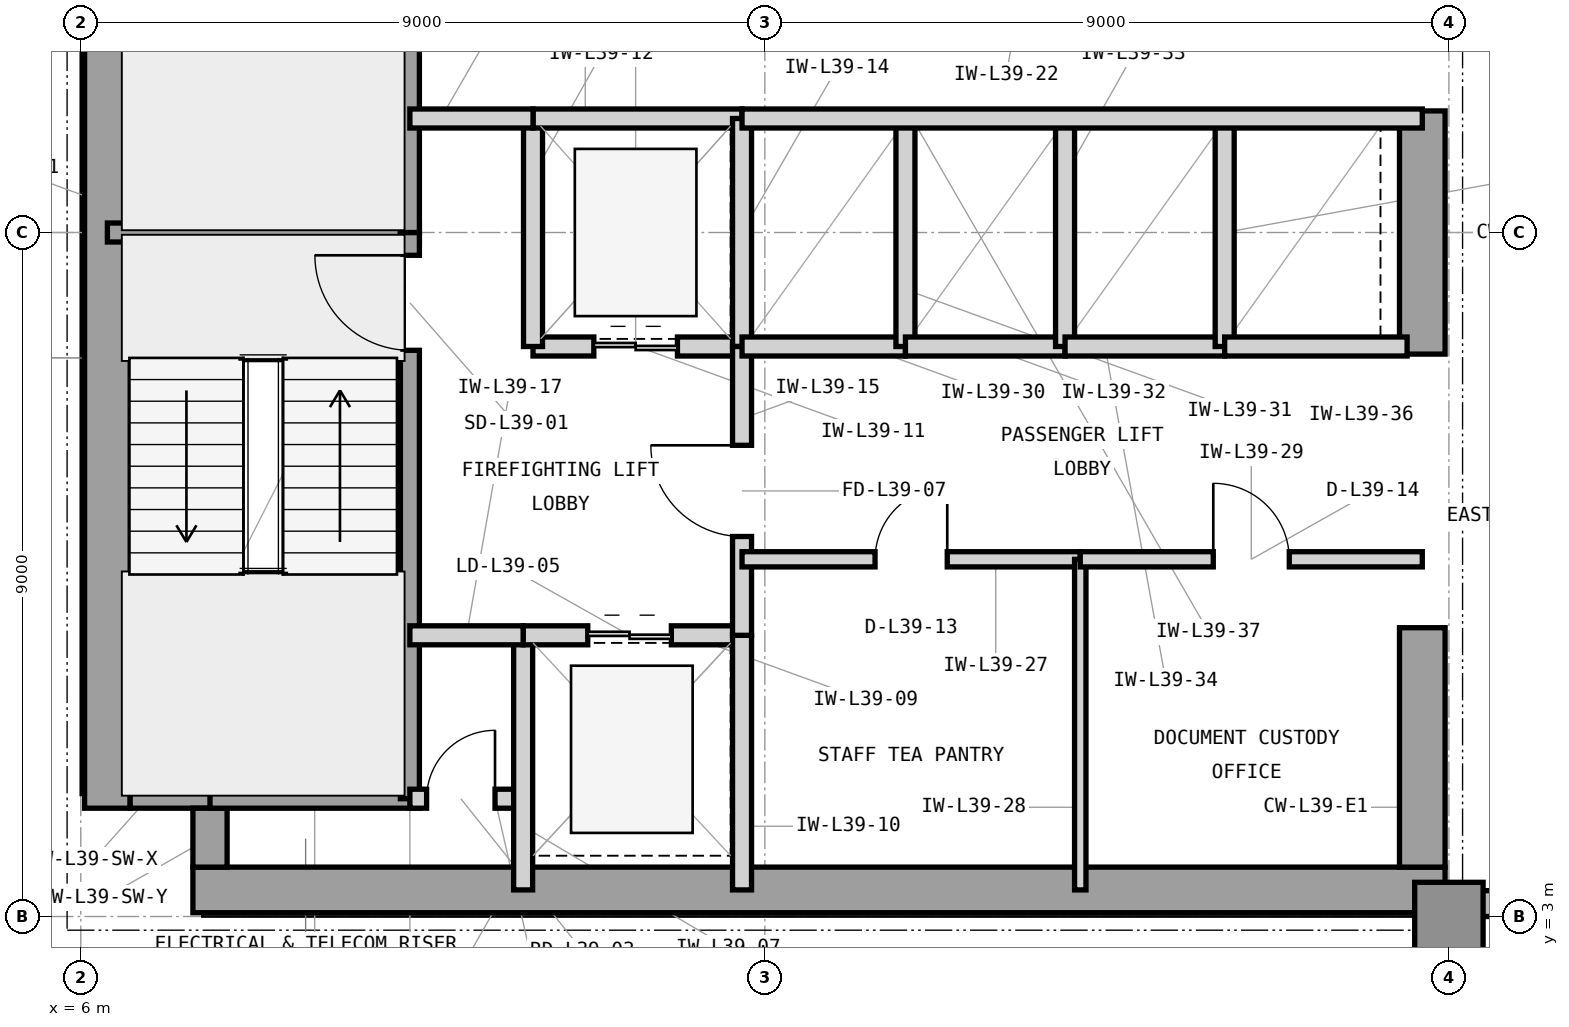
"""IFC4 building model, lengths in metres.
Left out: names, types, materials, properties, quantities, classifications, styles, units other than length and angle.
Written with IfcOpenShell. Run it as: python <this file> out.ifc"""

import sys

from ifc_helpers import new_model, si_unit, direction, frame, frame_2d, origin, origin_2d, place, context, subcontext, project, spatial, rectangle, extrude, element, fill, save


model = new_model("IFC4")
c1 = context("Model", 3, precision=1e-05, world=origin(), true_north=direction((0.0, 1.0)))
c2 = subcontext(c1, "Body", "Model", "MODEL_VIEW")
j1 = project(units=[si_unit("LENGTHUNIT", "METRE"), si_unit("PLANEANGLEUNIT", "RADIAN")], contexts=[c1])
p1 = place(None, origin())
s1 = spatial("IfcSite", under=j1, at=p1, CompositionType="ELEMENT")
p2 = place(p1, origin())
s2 = spatial("IfcBuilding", under=s1, at=p2, CompositionType="ELEMENT")
p3 = place(p2, frame((0.0, 0.0, 164.4)))
s3 = spatial("IfcBuildingStorey", under=s2, at=p3, CompositionType="ELEMENT", Elevation=164.4)
p4 = place(p3, frame((7.475, 3.35, 0.0), z_axis=(0.0, 0.0, 1.0), x_axis=(1.0, 0.0, 0.0)))
e1 = element("IfcWall", 1, at=p4, inside=s3, PredefinedType="SHEAR", context=c2, shape_type="SweptSolid", body=[
    extrude(rectangle(XDim=16.475, YDim=0.6, at=frame_2d((8.237, 0.0))), origin(), (0.0, 0.0, 1.0), 3.9),
])
p5 = place(p3, frame((6.35, 4.425, 0.0), z_axis=(0.0, 0.0, 1.0), x_axis=(0.0, 1.0, 0.0)))
e2 = element("IfcWall", 2, at=p5, inside=s3, PredefinedType="SHEAR", context=c2, shape_type="SweptSolid", body=[
    extrude(rectangle(XDim=15.15, YDim=0.6, at=frame_2d((7.575, 0.0))), origin(), (0.0, 0.0, 1.0), 3.9),
])
p6 = place(p3, frame((23.65, 3.65, 0.0), z_axis=(0.0, 0.0, 1.0), x_axis=(0.0, 1.0, 0.0)))
e3 = element("IfcWall", 3, at=p6, inside=s3, PredefinedType="SHEAR", context=c2, shape_type="SweptSolid", body=[
    extrude(rectangle(XDim=3.15, YDim=0.6, at=frame_2d((1.575, 0.0))), origin(), (0.0, 0.0, 1.0), 3.9),
])
p7 = place(p3, frame((23.65, 10.4, 0.0), z_axis=(0.0, 0.0, 1.0), x_axis=(0.0, 1.0, 0.0)))
e4 = element("IfcWall", 4, at=p7, inside=s3, PredefinedType="SHEAR", context=c2, shape_type="SweptSolid", body=[
    extrude(rectangle(XDim=3.2, YDim=0.6, at=frame_2d((1.6, 0.0))), origin(), (0.0, 0.0, 1.0), 3.9),
])
p8 = place(p3, frame((6.65, 4.65, 0.0), z_axis=(0.0, 0.0, 1.0), x_axis=(1.0, 0.0, 0.0)))
e5 = element("IfcWall", 5, at=p8, inside=s3, PredefinedType="SHEAR", context=c2, shape_type="SweptSolid", body=[
    extrude(rectangle(XDim=1.275, YDim=0.45, at=frame_2d((0.638, 0.0))), origin(), (0.0, 0.0, 1.0), 3.9),
])
p9 = place(p3, frame((7.7, 3.65, 0.0), z_axis=(0.0, 0.0, 1.0), x_axis=(0.0, 1.0, 0.0)))
e6 = element("IfcWall", 6, at=p9, inside=s3, PredefinedType="SHEAR", context=c2, shape_type="SweptSolid", body=[
    extrude(rectangle(XDim=0.775, YDim=0.45, at=frame_2d((0.388, 0.0))), origin(), (0.0, 0.0, 1.0), 3.9),
])
p10 = place(p3, frame((24.0, 3.0, 0.0), z_axis=(0.0, 0.0, 1.0), x_axis=(1.0, 0.0, 0.0)))
e7 = element("IfcColumn", 7, at=p10, inside=s3, PredefinedType="COLUMN", context=c2, shape_type="SweptSolid", body=[
    extrude(rectangle(XDim=0.9, YDim=0.9, at=origin_2d()), origin(), (0.0, 0.0, 1.0), 3.9),
])
p11 = place(p3, frame((23.9, 3.17, 0.0), z_axis=(0.0, 0.0, 1.0), x_axis=(1.0, 0.0, 0.0)))
e8 = element("IfcWall", 8, at=p11, inside=s3, PredefinedType="STANDARD", context=c2, shape_type="SweptSolid", body=[
    extrude(rectangle(XDim=31.5, YDim=0.34, at=frame_2d((15.75, 0.0))), origin(), (0.0, 0.0, 1.0), 3.7),
])
p12 = place(p11, frame((5.6, 0.0, 0.9)))
e9 = element("IfcOpeningElement", 9, at=p12, cuts=e8, PredefinedType="OPENING", context=c2, shape_type="SweptSolid", body=[
    extrude(rectangle(XDim=2.3, YDim=2.2, at=frame_2d((1.15, 1.1))), frame((0.0, 0.18, 0.0), z_axis=(0.0, -1.0, 0.0), x_axis=(1.0, 0.0, 0.0)), (0.0, 0.0, 1.0), 0.36),
])
p13 = place(p11, frame((10.1, 0.0, 0.9)))
e10 = element("IfcOpeningElement", 10, at=p13, cuts=e8, PredefinedType="OPENING", context=c2, shape_type="SweptSolid", body=[
    extrude(rectangle(XDim=2.3, YDim=2.2, at=frame_2d((1.15, 1.1))), frame((0.0, 0.18, 0.0), z_axis=(0.0, -1.0, 0.0), x_axis=(1.0, 0.0, 0.0)), (0.0, 0.0, 1.0), 0.36),
])
p14 = place(p11, frame((14.6, 0.0, 0.9)))
e11 = element("IfcOpeningElement", 11, at=p14, cuts=e8, PredefinedType="OPENING", context=c2, shape_type="SweptSolid", body=[
    extrude(rectangle(XDim=2.3, YDim=2.2, at=frame_2d((1.15, 1.1))), frame((0.0, 0.18, 0.0), z_axis=(0.0, -1.0, 0.0), x_axis=(1.0, 0.0, 0.0)), (0.0, 0.0, 1.0), 0.36),
])
p15 = place(p11, frame((19.1, 0.0, 0.9)))
e12 = element("IfcOpeningElement", 12, at=p15, cuts=e8, PredefinedType="OPENING", context=c2, shape_type="SweptSolid", body=[
    extrude(rectangle(XDim=2.3, YDim=2.2, at=frame_2d((1.15, 1.1))), frame((0.0, 0.18, 0.0), z_axis=(0.0, -1.0, 0.0), x_axis=(1.0, 0.0, 0.0)), (0.0, 0.0, 1.0), 0.36),
])
p16 = place(p3, frame((6.35, 12.0, 0.0), z_axis=(0.0, 0.0, 1.0), x_axis=(1.0, 0.0, 0.0)))
e13 = element("IfcWall", 13, at=p16, inside=s3, PredefinedType="SHEAR", context=c2, shape_type="SweptSolid", body=[
    extrude(rectangle(XDim=4.105, YDim=0.25, at=frame_2d((2.052, 0.0))), origin(), (0.0, 0.0, 1.0), 3.9),
])
p17 = place(p3, frame((7.7, 4.55, 0.0), z_axis=(0.0, 0.0, 1.0), x_axis=(1.0, 0.0, 0.0)))
e14 = element("IfcWall", 14, at=p17, inside=s3, PredefinedType="SHEAR", context=c2, shape_type="SweptSolid", body=[
    extrude(rectangle(XDim=2.755, YDim=0.25, at=frame_2d((1.377, 0.0))), origin(), (0.0, 0.0, 1.0), 3.9),
])
p18 = place(p3, frame((10.33, 4.55, 0.0), z_axis=(0.0, 0.0, 1.0), x_axis=(0.0, 1.0, 0.0)))
e15 = element("IfcWall", 15, at=p18, inside=s3, PredefinedType="SHEAR", context=c2, shape_type="SweptSolid", body=[
    extrude(rectangle(XDim=7.45, YDim=0.25, at=frame_2d((3.725, 0.0))), origin(), (0.0, 0.0, 1.0), 3.9),
])
p19 = place(p18, frame((5.9, 0.0, 0.0)))
e16 = element("IfcOpeningElement", 16, at=p19, cuts=e15, PredefinedType="OPENING", context=c2, shape_type="SweptSolid", body=[
    extrude(rectangle(XDim=1.25, YDim=2.2, at=frame_2d((0.625, 1.1))), frame((0.0, 0.135, 0.0), z_axis=(0.0, -1.0, 0.0), x_axis=(1.0, 0.0, 0.0)), (0.0, 0.0, 1.0), 0.27),
])
p20 = place(p3, frame((10.33, 12.0, 0.0), z_axis=(0.0, 0.0, 1.0), x_axis=(0.0, 1.0, 0.0)))
e17 = element("IfcWall", 17, at=p20, inside=s3, PredefinedType="SHEAR", context=c2, shape_type="SweptSolid", body=[
    extrude(rectangle(XDim=7.45, YDim=0.25, at=frame_2d((3.725, 0.0))), origin(), (0.0, 0.0, 1.0), 3.9),
])
p21 = place(p20, frame((5.85, 0.0, 0.0)))
e18 = element("IfcOpeningElement", 18, at=p21, cuts=e17, PredefinedType="OPENING", context=c2, shape_type="SweptSolid", body=[
    extrude(rectangle(XDim=1.25, YDim=2.2, at=frame_2d((0.625, 1.1))), frame((0.0, 0.135, 0.0), z_axis=(0.0, -1.0, 0.0), x_axis=(1.0, 0.0, 0.0)), (0.0, 0.0, 1.0), 0.27),
])
p22 = place(p3, frame((10.33, 4.55, 0.0), z_axis=(0.0, 0.0, 1.0), x_axis=(1.0, 0.0, 0.0)))
e19 = element("IfcWall", 19, at=p22, inside=s3, PredefinedType="PARTITIONING", context=c2, shape_type="SweptSolid", body=[
    extrude(rectangle(XDim=1.49, YDim=0.25, at=frame_2d((0.745, 0.0))), origin(), (0.0, 0.0, 1.0), 3.69),
])
p23 = place(p22, frame((0.22, 0.0, 0.0)))
e20 = element("IfcOpeningElement", 20, at=p23, cuts=e19, PredefinedType="OPENING", context=c2, shape_type="SweptSolid", body=[
    extrude(rectangle(XDim=0.9, YDim=2.1, at=frame_2d((0.45, 1.05))), frame((0.0, 0.135, 0.0), z_axis=(0.0, -1.0, 0.0), x_axis=(1.0, 0.0, 0.0)), (0.0, 0.0, 1.0), 0.27),
])
p24 = place(p3, frame((11.82, 3.35, 0.0), z_axis=(0.0, 0.0, 1.0), x_axis=(0.0, 1.0, 0.0)))
e21 = element("IfcWall", 21, at=p24, inside=s3, PredefinedType="PARTITIONING", context=c2, shape_type="SweptSolid", body=[
    extrude(rectangle(XDim=3.35, YDim=0.25, at=frame_2d((1.675, 0.0))), origin(), (0.0, 0.0, 1.0), 3.69),
])
p25 = place(p3, frame((11.82, 6.7, 0.0), z_axis=(0.0, 0.0, 1.0), x_axis=(1.0, 0.0, 0.0)))
e22 = element("IfcWall", 22, at=p25, inside=s3, PredefinedType="PARTITIONING", context=c2, shape_type="SweptSolid", body=[
    extrude(rectangle(XDim=2.88, YDim=0.25, at=frame_2d((1.44, 0.0))), origin(), (0.0, 0.0, 1.0), 3.283),
])
p26 = place(p25, frame((0.85, 0.0, 0.0)))
e23 = element("IfcOpeningElement", 23, at=p26, cuts=e22, PredefinedType="OPENING", context=c2, shape_type="SweptSolid", body=[
    extrude(rectangle(XDim=1.1, YDim=2.25, at=frame_2d((0.55, 1.125))), frame((0.0, 0.135, 0.0), z_axis=(0.0, -1.0, 0.0), x_axis=(1.0, 0.0, 0.0)), (0.0, 0.0, 1.0), 0.27),
])
p27 = place(p3, frame((14.7, 3.35, 0.0), z_axis=(0.0, 0.0, 1.0), x_axis=(0.0, 1.0, 0.0)))
e24 = element("IfcWall", 24, at=p27, inside=s3, PredefinedType="PARTITIONING", context=c2, shape_type="SweptSolid", body=[
    extrude(rectangle(XDim=3.35, YDim=0.25, at=frame_2d((1.675, 0.0))), origin(), (0.0, 0.0, 1.0), 3.69),
])
p28 = place(p3, frame((11.95, 10.5, 0.0), z_axis=(0.0, 0.0, 1.0), x_axis=(1.0, 0.0, 0.0)))
e25 = element("IfcWall", 25, at=p28, inside=s3, PredefinedType="PARTITIONING", context=c2, shape_type="SweptSolid", body=[
    extrude(rectangle(XDim=2.75, YDim=0.25, at=frame_2d((1.375, 0.0))), origin(), (0.0, 0.0, 1.0), 3.283),
])
p29 = place(p28, frame((0.8, 0.0, 0.0)))
e26 = element("IfcOpeningElement", 26, at=p29, cuts=e25, PredefinedType="OPENING", context=c2, shape_type="SweptSolid", body=[
    extrude(rectangle(XDim=1.1, YDim=2.25, at=frame_2d((0.55, 1.125))), frame((0.0, 0.135, 0.0), z_axis=(0.0, -1.0, 0.0), x_axis=(1.0, 0.0, 0.0)), (0.0, 0.0, 1.0), 0.27),
])
p30 = place(p3, frame((11.95, 10.5, 0.0), z_axis=(0.0, 0.0, 1.0), x_axis=(0.0, 1.0, 0.0)))
e27 = element("IfcWall", 27, at=p30, inside=s3, PredefinedType="PARTITIONING", context=c2, shape_type="SweptSolid", body=[
    extrude(rectangle(XDim=3.0, YDim=0.25, at=frame_2d((1.5, 0.0))), origin(), (0.0, 0.0, 1.0), 3.69),
])
p31 = place(p3, frame((11.95, 13.5, 0.0), z_axis=(0.0, 0.0, 1.0), x_axis=(1.0, 0.0, 0.0)))
e28 = element("IfcWall", 28, at=p31, inside=s3, PredefinedType="PARTITIONING", context=c2, shape_type="SweptSolid", body=[
    extrude(rectangle(XDim=2.75, YDim=0.25, at=frame_2d((1.375, 0.0))), origin(), (0.0, 0.0, 1.0), 3.283),
])
p32 = place(p3, frame((14.7, 10.5, 0.0), z_axis=(0.0, 0.0, 1.0), x_axis=(0.0, 1.0, 0.0)))
e29 = element("IfcWall", 29, at=p32, inside=s3, PredefinedType="PARTITIONING", context=c2, shape_type="SweptSolid", body=[
    extrude(rectangle(XDim=3.0, YDim=0.25, at=frame_2d((1.5, 0.0))), origin(), (0.0, 0.0, 1.0), 3.69),
])
p33 = place(p3, frame((14.7, 6.7, 0.0), z_axis=(0.0, 0.0, 1.0), x_axis=(0.0, 1.0, 0.0)))
e30 = element("IfcWall", 30, at=p33, inside=s3, PredefinedType="PARTITIONING", context=c2, shape_type="SweptSolid", body=[
    extrude(rectangle(XDim=3.8, YDim=0.25, at=frame_2d((1.9, 0.0))), origin(), (0.0, 0.0, 1.0), 3.69),
])
p34 = place(p33, frame((1.3, 0.0, 0.0)))
e31 = element("IfcOpeningElement", 31, at=p34, cuts=e30, PredefinedType="OPENING", context=c2, shape_type="SweptSolid", body=[
    extrude(rectangle(XDim=1.2, YDim=2.2, at=frame_2d((0.6, 1.1))), frame((0.0, 0.135, 0.0), z_axis=(0.0, -1.0, 0.0), x_axis=(1.0, 0.0, 0.0)), (0.0, 0.0, 1.0), 0.27),
])
p35 = place(p3, frame((10.33, 13.5, 0.0), z_axis=(0.0, 0.0, 1.0), x_axis=(1.0, 0.0, 0.0)))
e32 = element("IfcWall", 32, at=p35, inside=s3, PredefinedType="PARTITIONING", context=c2, shape_type="SweptSolid", body=[
    extrude(rectangle(XDim=1.62, YDim=0.25, at=frame_2d((0.81, 0.0))), origin(), (0.0, 0.0, 1.0), 3.283),
])
p36 = place(p3, frame((10.33, 6.7, 0.0), z_axis=(0.0, 0.0, 1.0), x_axis=(1.0, 0.0, 0.0)))
e33 = element("IfcWall", 33, at=p36, inside=s3, PredefinedType="PARTITIONING", context=c2, shape_type="SweptSolid", body=[
    extrude(rectangle(XDim=1.49, YDim=0.25, at=frame_2d((0.745, 0.0))), origin(), (0.0, 0.0, 1.0), 3.283),
])
p37 = place(p3, frame((14.7, 7.7, 0.0), z_axis=(0.0, 0.0, 1.0), x_axis=(1.0, 0.0, 0.0)))
e34 = element("IfcWall", 34, at=p37, inside=s3, PredefinedType="PARTITIONING", context=c2, shape_type="SweptSolid", body=[
    extrude(rectangle(XDim=4.45, YDim=0.2, at=frame_2d((2.225, 0.0))), origin(), (0.0, 0.0, 1.0), 3.69),
])
p38 = place(p37, frame((1.75, 0.0, 0.0)))
e35 = element("IfcOpeningElement", 35, at=p38, cuts=e34, PredefinedType="OPENING", context=c2, shape_type="SweptSolid", body=[
    extrude(rectangle(XDim=0.95, YDim=2.1, at=frame_2d((0.475, 1.05))), frame((0.0, 0.11, 0.0), z_axis=(0.0, -1.0, 0.0), x_axis=(1.0, 0.0, 0.0)), (0.0, 0.0, 1.0), 0.22),
])
p39 = place(p3, frame((19.15, 3.35, 0.0), z_axis=(0.0, 0.0, 1.0), x_axis=(0.0, 1.0, 0.0)))
e36 = element("IfcWall", 36, at=p39, inside=s3, PredefinedType="PARTITIONING", context=c2, shape_type="SweptSolid", body=[
    extrude(rectangle(XDim=4.35, YDim=0.15, at=frame_2d((2.175, 0.0))), origin(), (0.0, 0.0, 1.0), 3.69),
])
p40 = place(p3, frame((19.15, 7.7, 0.0), z_axis=(0.0, 0.0, 1.0), x_axis=(1.0, 0.0, 0.0)))
e37 = element("IfcWall", 37, at=p40, inside=s3, PredefinedType="PARTITIONING", context=c2, shape_type="SweptSolid", body=[
    extrude(rectangle(XDim=4.5, YDim=0.2, at=frame_2d((2.25, 0.0))), origin(), (0.0, 0.0, 1.0), 3.69),
])
p41 = place(p40, frame((1.75, 0.0, 0.0)))
e38 = element("IfcOpeningElement", 38, at=p41, cuts=e37, PredefinedType="OPENING", context=c2, shape_type="SweptSolid", body=[
    extrude(rectangle(XDim=1.0, YDim=2.15, at=frame_2d((0.5, 1.075))), frame((0.0, 0.11, 0.0), z_axis=(0.0, -1.0, 0.0), x_axis=(1.0, 0.0, 0.0)), (0.0, 0.0, 1.0), 0.22),
])
p42 = place(p3, frame((14.7, 10.5, 0.0), z_axis=(0.0, 0.0, 1.0), x_axis=(1.0, 0.0, 0.0)))
e39 = element("IfcWall", 39, at=p42, inside=s3, PredefinedType="PARTITIONING", context=c2, shape_type="SweptSolid", body=[
    extrude(rectangle(XDim=2.15, YDim=0.25, at=frame_2d((1.075, 0.0))), origin(), (0.0, 0.0, 1.0), 3.283),
])
p43 = place(p3, frame((16.85, 10.5, 0.0), z_axis=(0.0, 0.0, 1.0), x_axis=(0.0, 1.0, 0.0)))
e40 = element("IfcWall", 40, at=p43, inside=s3, PredefinedType="PARTITIONING", context=c2, shape_type="SweptSolid", body=[
    extrude(rectangle(XDim=3.0, YDim=0.25, at=frame_2d((1.5, 0.0))), origin(), (0.0, 0.0, 1.0), 3.69),
])
p44 = place(p3, frame((16.85, 10.5, 0.0), z_axis=(0.0, 0.0, 1.0), x_axis=(1.0, 0.0, 0.0)))
e41 = element("IfcWall", 41, at=p44, inside=s3, PredefinedType="PARTITIONING", context=c2, shape_type="SweptSolid", body=[
    extrude(rectangle(XDim=2.1, YDim=0.25, at=frame_2d((1.05, 0.0))), origin(), (0.0, 0.0, 1.0), 3.283),
])
p45 = place(p3, frame((18.95, 10.5, 0.0), z_axis=(0.0, 0.0, 1.0), x_axis=(0.0, 1.0, 0.0)))
e42 = element("IfcWall", 42, at=p45, inside=s3, PredefinedType="PARTITIONING", context=c2, shape_type="SweptSolid", body=[
    extrude(rectangle(XDim=3.0, YDim=0.25, at=frame_2d((1.5, 0.0))), origin(), (0.0, 0.0, 1.0), 3.69),
])
p46 = place(p3, frame((18.95, 10.5, 0.0), z_axis=(0.0, 0.0, 1.0), x_axis=(1.0, 0.0, 0.0)))
e43 = element("IfcWall", 43, at=p46, inside=s3, PredefinedType="PARTITIONING", context=c2, shape_type="SweptSolid", body=[
    extrude(rectangle(XDim=2.1, YDim=0.25, at=frame_2d((1.05, 0.0))), origin(), (0.0, 0.0, 1.0), 3.283),
])
p47 = place(p3, frame((21.05, 10.5, 0.0), z_axis=(0.0, 0.0, 1.0), x_axis=(0.0, 1.0, 0.0)))
e44 = element("IfcWall", 44, at=p47, inside=s3, PredefinedType="PARTITIONING", context=c2, shape_type="SweptSolid", body=[
    extrude(rectangle(XDim=3.0, YDim=0.25, at=frame_2d((1.5, 0.0))), origin(), (0.0, 0.0, 1.0), 3.69),
])
p48 = place(p3, frame((21.05, 10.5, 0.0), z_axis=(0.0, 0.0, 1.0), x_axis=(1.0, 0.0, 0.0)))
e45 = element("IfcWall", 45, at=p48, inside=s3, PredefinedType="PARTITIONING", context=c2, shape_type="SweptSolid", body=[
    extrude(rectangle(XDim=2.4, YDim=0.25, at=frame_2d((1.2, 0.0))), origin(), (0.0, 0.0, 1.0), 3.283),
])
p49 = place(p3, frame((14.7, 13.5, 0.0), z_axis=(0.0, 0.0, 1.0), x_axis=(1.0, 0.0, 0.0)))
e46 = element("IfcWall", 46, at=p49, inside=s3, PredefinedType="PARTITIONING", context=c2, shape_type="SweptSolid", body=[
    extrude(rectangle(XDim=8.95, YDim=0.25, at=frame_2d((4.475, 0.0))), origin(), (0.0, 0.0, 1.0), 3.283),
])
p50 = place(p19, origin())
e47 = element("IfcDoor", 47, at=p50, inside=s3, OperationType="SINGLE_SWING_RIGHT", PredefinedType="DOOR", context=c2, shape_type="SweptSolid", body=[
    extrude(rectangle(XDim=1.25, YDim=2.2, at=frame_2d((0.625, 1.1))), frame((0.0, 0.025, 0.0), z_axis=(0.0, -1.0, 0.0), x_axis=(1.0, 0.0, 0.0)), (0.0, 0.0, 1.0), 0.05),
])
fill(e16, e47)
p51 = place(p23, origin())
e48 = element("IfcDoor", 48, at=p51, inside=s3, OperationType="SINGLE_SWING_RIGHT", PredefinedType="TRAPDOOR", context=c2, shape_type="SweptSolid", body=[
    extrude(rectangle(XDim=0.9, YDim=2.1, at=frame_2d((0.45, 1.05))), frame((0.0, 0.025, 0.0), z_axis=(0.0, -1.0, 0.0), x_axis=(1.0, 0.0, 0.0)), (0.0, 0.0, 1.0), 0.05),
])
fill(e20, e48)
p52 = place(p26, origin())
e49 = element("IfcDoor", 49, at=p52, inside=s3, OperationType="DOUBLE_DOOR_SLIDING", PredefinedType="DOOR", context=c2, shape_type="SweptSolid", body=[
    extrude(rectangle(XDim=1.1, YDim=2.25, at=frame_2d((0.55, 1.125))), frame((0.0, 0.025, 0.0), z_axis=(0.0, -1.0, 0.0), x_axis=(1.0, 0.0, 0.0)), (0.0, 0.0, 1.0), 0.05),
])
fill(e23, e49)
p53 = place(p29, origin())
e50 = element("IfcDoor", 50, at=p53, inside=s3, OperationType="DOUBLE_DOOR_SLIDING", PredefinedType="DOOR", context=c2, shape_type="SweptSolid", body=[
    extrude(rectangle(XDim=1.1, YDim=2.25, at=frame_2d((0.55, 1.125))), frame((0.0, 0.025, 0.0), z_axis=(0.0, -1.0, 0.0), x_axis=(1.0, 0.0, 0.0)), (0.0, 0.0, 1.0), 0.05),
])
fill(e26, e50)
p54 = place(p34, origin())
e51 = element("IfcDoor", 51, at=p54, inside=s3, OperationType="SINGLE_SWING_RIGHT", PredefinedType="DOOR", context=c2, shape_type="SweptSolid", body=[
    extrude(rectangle(XDim=1.2, YDim=2.2, at=frame_2d((0.6, 1.1))), frame((0.0, 0.025, 0.0), z_axis=(0.0, -1.0, 0.0), x_axis=(1.0, 0.0, 0.0)), (0.0, 0.0, 1.0), 0.05),
])
fill(e31, e51)
p55 = place(p38, origin())
e52 = element("IfcDoor", 52, at=p55, inside=s3, OperationType="SINGLE_SWING_RIGHT", PredefinedType="DOOR", context=c2, shape_type="SweptSolid", body=[
    extrude(rectangle(XDim=0.95, YDim=2.1, at=frame_2d((0.475, 1.05))), frame((0.0, 0.025, 0.0), z_axis=(0.0, -1.0, 0.0), x_axis=(1.0, 0.0, 0.0)), (0.0, 0.0, 1.0), 0.05),
])
fill(e35, e52)
p56 = place(p41, origin())
e53 = element("IfcDoor", 53, at=p56, inside=s3, OperationType="SINGLE_SWING_LEFT", PredefinedType="DOOR", context=c2, shape_type="SweptSolid", body=[
    extrude(rectangle(XDim=1.0, YDim=2.15, at=frame_2d((0.5, 1.075))), frame((0.0, 0.025, 0.0), z_axis=(0.0, -1.0, 0.0), x_axis=(1.0, 0.0, 0.0)), (0.0, 0.0, 1.0), 0.05),
])
fill(e38, e53)
save(model, sys.argv[1])
